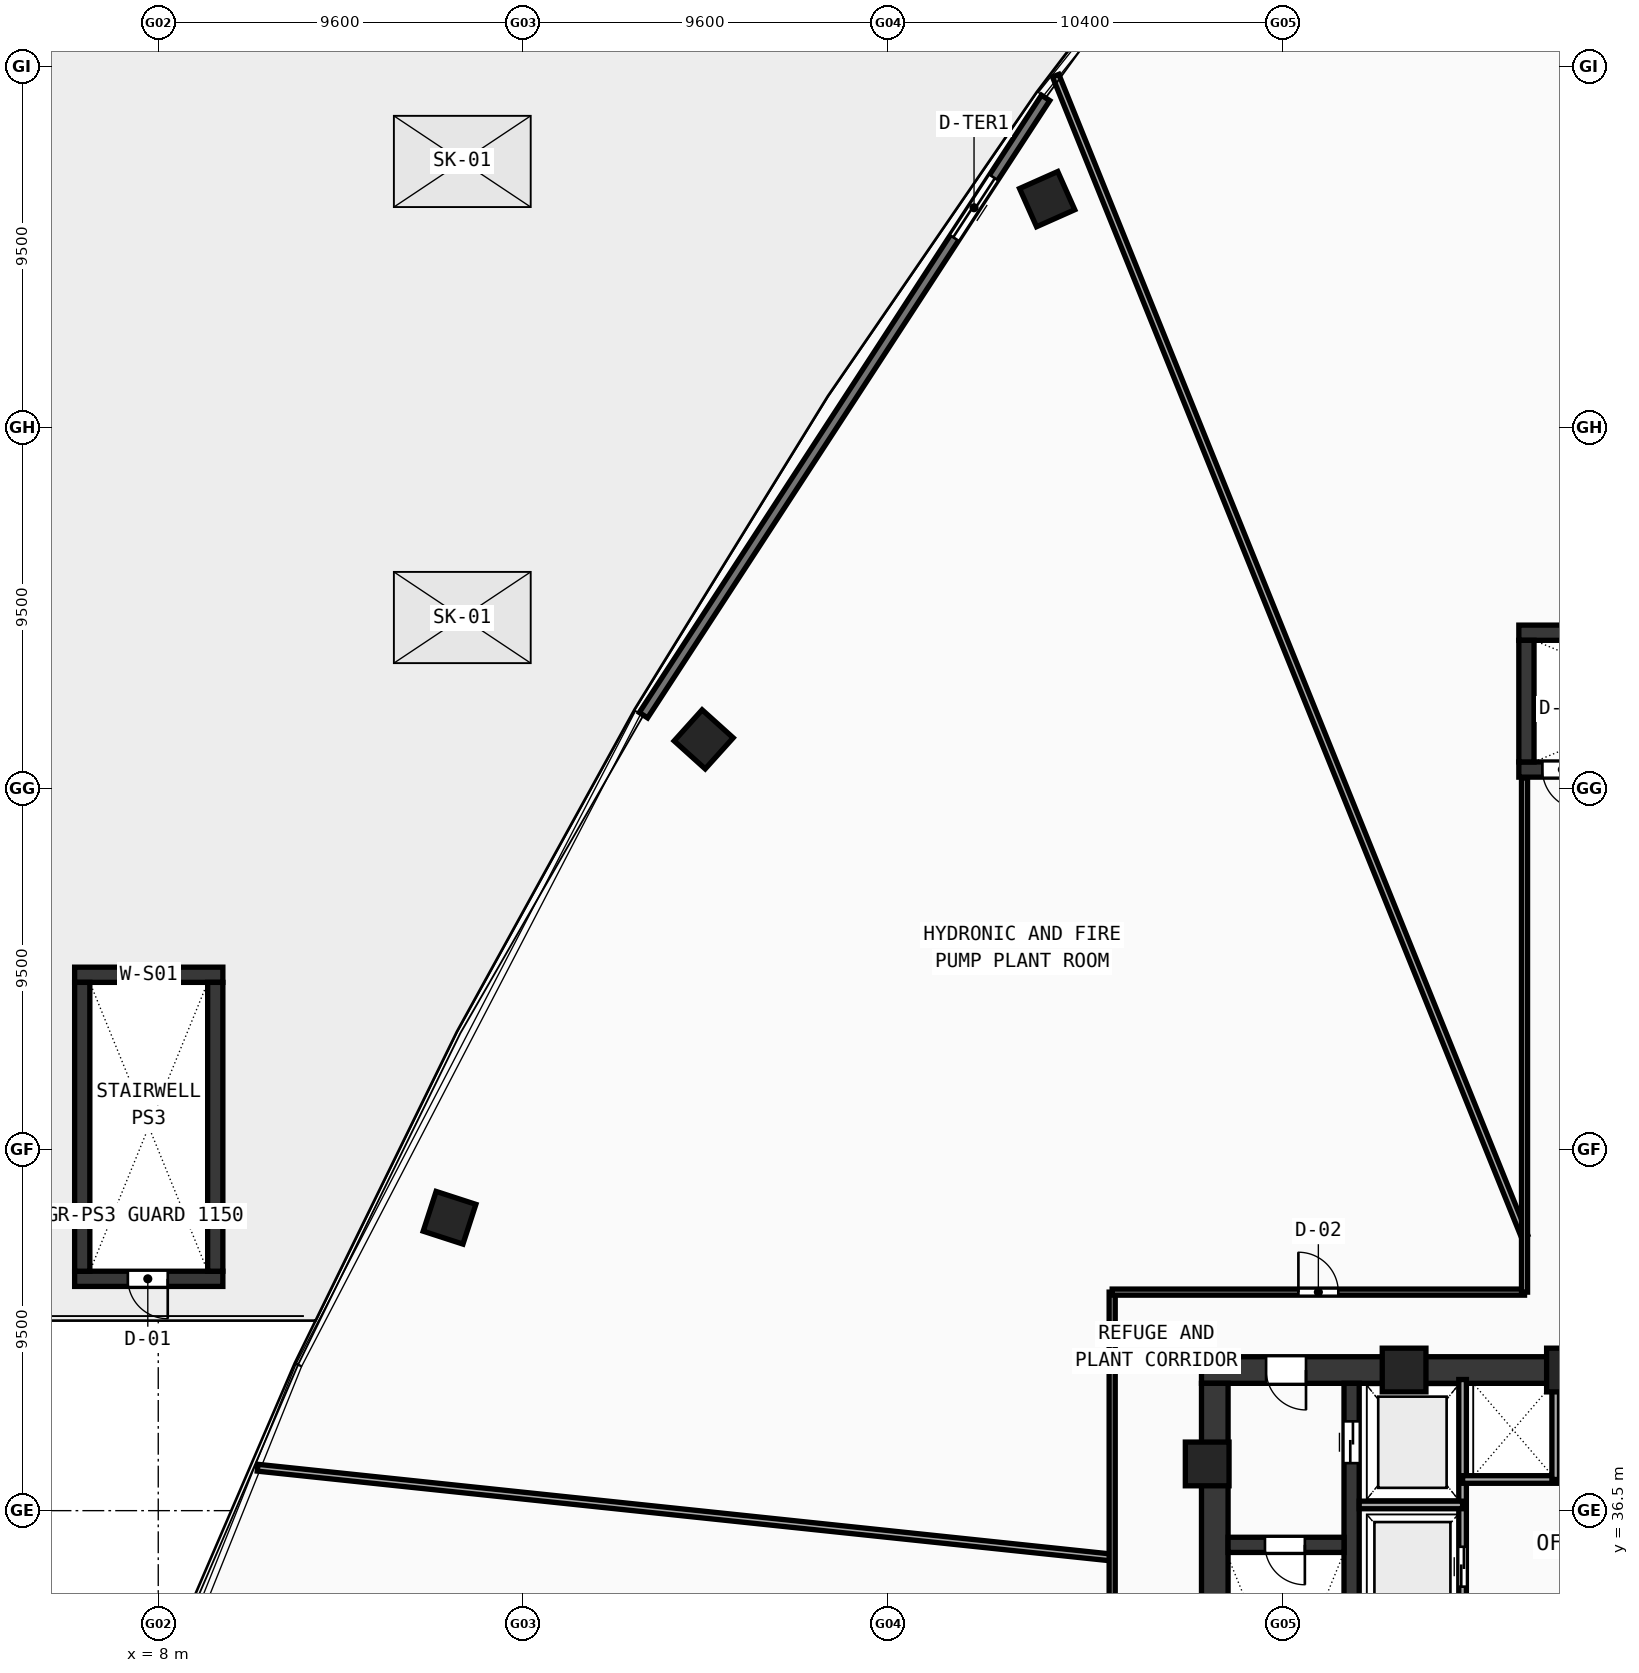
"""IFC4 building model, lengths in metres.
Left out: names, types, materials, properties, quantities, classifications, styles, units other than length and angle.
Written with IfcOpenShell. Run it as: python <this file> out.ifc"""

import sys

from ifc_helpers import new_model, si_unit, direction, frame, frame_2d, origin, origin_with_axes, origin_2d, place, context, subcontext, project, spatial, rectangle, hollow_rectangle, extrude, source, transform, mapped, element, fill, save


model = new_model("IFC4")
c1 = context("Model", 3, precision=1e-05, world=origin(), true_north=direction((0.0, 1.0)))
c2 = subcontext(c1, "Body", "Model", "MODEL_VIEW")
j1 = project(units=[si_unit("LENGTHUNIT", "METRE"), si_unit("PLANEANGLEUNIT", "RADIAN")], contexts=[c1])
p1 = place(None, origin())
s1 = spatial("IfcSite", under=j1, at=p1, CompositionType="ELEMENT")
p2 = place(p1, origin())
s2 = spatial("IfcBuilding", under=s1, at=p2, CompositionType="ELEMENT")
p3 = place(p2, frame((0.0, 0.0, 25.4)))
s3 = spatial("IfcBuildingStorey", under=s2, at=p3, CompositionType="ELEMENT", Elevation=25.4)
p4 = place(p3, frame((35.45, 40.2, 0.0), z_axis=(0.0, 0.0, 1.0), x_axis=(1.0, 0.0, 0.0)))
e1 = element("IfcWall", 1, at=p4, inside=s3, PredefinedType="SHEAR", context=c2, shape_type="SweptSolid", body=[
    extrude(rectangle(XDim=11.35, YDim=0.7, at=frame_2d((5.675, 0.0))), origin(), (0.0, 0.0, 1.0), 4.74),
])
p5 = place(p4, frame((1.7, 0.0, 0.0)))
e2 = element("IfcOpeningElement", 2, at=p5, cuts=e1, PredefinedType="OPENING", context=c2, shape_type="SweptSolid", body=[
    extrude(rectangle(XDim=1.05, YDim=2.1, at=frame_2d((0.525, 1.05))), frame((0.0, 0.36, 0.0), z_axis=(0.0, -1.0, 0.0), x_axis=(1.0, 0.0, 0.0)), (0.0, 0.0, 1.0), 0.72),
])
p6 = place(p3, frame((35.8, 27.85, 0.0), z_axis=(0.0, 0.0, 1.0), x_axis=(0.0, 1.0, 0.0)))
e3 = element("IfcWall", 3, at=p6, inside=s3, PredefinedType="SHEAR", context=c2, shape_type="SweptSolid", body=[
    extrude(rectangle(XDim=12.0, YDim=0.7, at=frame_2d((6.0, 0.0))), origin(), (0.0, 0.0, 1.0), 4.74),
])
p7 = place(p3, frame((39.4, 27.85, 0.0), z_axis=(0.0, 0.0, 1.0), x_axis=(0.0, 1.0, 0.0)))
e4 = element("IfcWall", 4, at=p7, inside=s3, PredefinedType="SHEAR", context=c2, shape_type="SweptSolid", body=[
    extrude(rectangle(XDim=12.0, YDim=0.4, at=frame_2d((6.0, 0.0))), origin(), (0.0, 0.0, 1.0), 4.74),
])
p8 = place(p7, frame((9.9, 0.0, 0.0)))
e5 = element("IfcOpeningElement", 5, at=p8, cuts=e4, PredefinedType="OPENING", context=c2, shape_type="SweptSolid", body=[
    extrude(rectangle(XDim=1.1, YDim=2.1, at=frame_2d((0.55, 1.05))), frame((0.0, 0.21, 0.0), z_axis=(0.0, -1.0, 0.0), x_axis=(1.0, 0.0, 0.0)), (0.0, 0.0, 1.0), 0.42),
])
p9 = place(p3, frame((36.15, 35.6, 0.0), z_axis=(0.0, 0.0, 1.0), x_axis=(1.0, 0.0, 0.0)))
e6 = element("IfcWall", 6, at=p9, inside=s3, PredefinedType="SHEAR", context=c2, shape_type="SweptSolid", body=[
    extrude(rectangle(XDim=3.05, YDim=0.4, at=frame_2d((1.525, 0.0))), origin(), (0.0, 0.0, 1.0), 4.74),
])
p10 = place(p9, frame((0.97, 0.0, 0.0)))
e7 = element("IfcOpeningElement", 7, at=p10, cuts=e6, PredefinedType="OPENING", context=c2, shape_type="SweptSolid", body=[
    extrude(rectangle(XDim=1.05, YDim=2.1, at=frame_2d((0.525, 1.05))), frame((0.0, 0.21, 0.0), z_axis=(0.0, -1.0, 0.0), x_axis=(1.0, 0.0, 0.0)), (0.0, 0.0, 1.0), 0.42),
])
p11 = place(p3, frame((5.8, 50.6, 0.0), z_axis=(0.0, 0.0, 1.0), x_axis=(1.0, 0.0, 0.0)))
e8 = element("IfcWall", 8, at=p11, inside=s3, PredefinedType="SHEAR", context=c2, shape_type="SweptSolid", body=[
    extrude(rectangle(XDim=3.9, YDim=0.4, at=frame_2d((1.95, 0.0))), origin(), (0.0, 0.0, 1.0), 4.74),
])
p12 = place(p3, frame((5.8, 42.6, 0.0), z_axis=(0.0, 0.0, 1.0), x_axis=(1.0, 0.0, 0.0)))
e9 = element("IfcWall", 9, at=p12, inside=s3, PredefinedType="SHEAR", context=c2, shape_type="SweptSolid", body=[
    extrude(rectangle(XDim=3.9, YDim=0.4, at=frame_2d((1.95, 0.0))), origin(), (0.0, 0.0, 1.0), 4.74),
])
p13 = place(p12, frame((1.4, 0.0, 0.0)))
e10 = element("IfcOpeningElement", 10, at=p13, cuts=e9, PredefinedType="OPENING", context=c2, shape_type="SweptSolid", body=[
    extrude(rectangle(XDim=1.05, YDim=2.1, at=frame_2d((0.525, 1.05))), frame((0.0, 0.21, 0.0), z_axis=(0.0, -1.0, 0.0), x_axis=(1.0, 0.0, 0.0)), (0.0, 0.0, 1.0), 0.42),
])
for number, where, z_axis, x_axis in (
    (11, (6.0, 42.8, 0.0), (0.0, 0.0, 1.0), (0.0, 1.0, 0.0)),
    (12, (9.5, 42.8, 0.0), (0.0, 0.0, 1.0), (0.0, 1.0, 0.0)),
):
    element("IfcWall", number, at=place(p3, frame(where, z_axis=z_axis, x_axis=x_axis)), inside=s3, PredefinedType="SHEAR", context=c2, shape_type="SweptSolid", body=[
        extrude(rectangle(XDim=7.6, YDim=0.4, at=frame_2d((3.8, 0.0))), origin(), (0.0, 0.0, 1.0), 4.74),
    ])
p14 = place(p3, frame((43.8, 59.6, 0.0), z_axis=(0.0, 0.0, 1.0), x_axis=(1.0, 0.0, 0.0)))
e13 = element("IfcWall", 13, at=p14, inside=s3, PredefinedType="SHEAR", context=c2, shape_type="SweptSolid", body=[
    extrude(rectangle(XDim=8.5, YDim=0.4, at=frame_2d((4.25, 0.0))), origin(), (0.0, 0.0, 1.0), 4.74),
])
p15 = place(p3, frame((43.8, 56.0, 0.0), z_axis=(0.0, 0.0, 1.0), x_axis=(1.0, 0.0, 0.0)))
e14 = element("IfcWall", 14, at=p15, inside=s3, PredefinedType="SHEAR", context=c2, shape_type="SweptSolid", body=[
    extrude(rectangle(XDim=8.5, YDim=0.4, at=frame_2d((4.25, 0.0))), origin(), (0.0, 0.0, 1.0), 4.74),
])
p16 = place(p15, frame((0.62, 0.0, 0.0)))
e15 = element("IfcOpeningElement", 15, at=p16, cuts=e14, PredefinedType="OPENING", context=c2, shape_type="SweptSolid", body=[
    extrude(rectangle(XDim=1.05, YDim=2.1, at=frame_2d((0.525, 1.05))), frame((0.0, 0.21, 0.0), z_axis=(0.0, -1.0, 0.0), x_axis=(1.0, 0.0, 0.0)), (0.0, 0.0, 1.0), 0.42),
])
p17 = place(p3, frame((44.0, 56.2, 0.0), z_axis=(0.0, 0.0, 1.0), x_axis=(0.0, 1.0, 0.0)))
e16 = element("IfcWall", 16, at=p17, inside=s3, PredefinedType="SHEAR", context=c2, shape_type="SweptSolid", body=[
    extrude(rectangle(XDim=3.2, YDim=0.4, at=frame_2d((1.6, 0.0))), origin(), (0.0, 0.0, 1.0), 4.74),
])
m1 = source(origin(), c2, "Body", "SweptSolid", [
    extrude(hollow_rectangle(XDim=1.15, YDim=1.15, WallThickness=0.048, at=origin_2d()), origin(), (0.0, 0.0, 1.0), 5.02),
])
for number, where, z_axis, x_axis in (
    (17, (45.106, 40.2, -0.28), (0.0, 0.0, 1.0), (1.0, 0.0, 0.0)),
    (18, (40.781, 40.2, -0.28), (0.0, 0.0, 1.0), (1.0, 0.0, 0.0)),
    (19, (35.6, 37.729, -0.28), (0.0, 0.0, 1.0), (1.0, 0.0, 0.0)),
):
    element("IfcColumn", number, at=place(p3, frame(where, z_axis=z_axis, x_axis=x_axis)), inside=s3, PredefinedType="COLUMN", context=c2, shape_type="MappedRepresentation", body=[
        mapped(m1, transform((0.0, 0.0, 0.0), scale=1.0)),
    ])
m2 = source(origin(), c2, "Body", "SweptSolid", [
    extrude(hollow_rectangle(XDim=1.1, YDim=1.1, WallThickness=0.045, at=origin_2d()), origin(), (0.0, 0.0, 1.0), 5.02),
])
for number, where, z_axis, x_axis in (
    (20, (31.389, 71.009, -0.28), (0.0, 0.0, 1.0), (-0.914, -0.407, 0.0)),
    (21, (22.351, 56.794, -0.28), (0.0, 0.0, 1.0), (-0.669, -0.743, 0.0)),
    (22, (15.665, 44.206, -0.28), (0.0, 0.0, 1.0), (-0.309, -0.951, 0.0)),
):
    element("IfcColumn", number, at=place(p3, frame(where, z_axis=z_axis, x_axis=x_axis)), inside=s3, PredefinedType="COLUMN", context=c2, shape_type="MappedRepresentation", body=[
        mapped(m2, transform((0.0, 0.0, 0.0), scale=1.0)),
    ])
p18 = place(p3, frame((31.348, 73.673, 0.0), z_axis=(0.0, 0.0, 1.0), x_axis=(-0.54584859594, -0.837883828648, 0.0)))
e23 = element("IfcWall", 23, at=p18, inside=s3, PredefinedType="STANDARD", context=c2, shape_type="SweptSolid", body=[
    extrude(rectangle(XDim=19.386, YDim=0.26, at=frame_2d((9.693, 0.0))), origin(), (0.0, 0.0, 1.0), 4.24),
])
p19 = place(p18, frame((2.5, 0.0, 0.0)))
e24 = element("IfcOpeningElement", 24, at=p19, cuts=e23, PredefinedType="OPENING", context=c2, shape_type="SweptSolid", body=[
    extrude(rectangle(XDim=1.9, YDim=2.2, at=frame_2d((0.95, 1.1))), frame((0.0, 0.14, 0.0), z_axis=(0.0, -1.0, 0.0), x_axis=(1.0, 0.0, 0.0)), (0.0, 0.0, 1.0), 0.28),
])
p20 = place(p3, frame((42.32, 33.5, 0.0), z_axis=(0.0, 0.0, 1.0), x_axis=(0.0, 1.0, 0.0)))
e25 = element("IfcWall", 25, at=p20, inside=s3, PredefinedType="SOLIDWALL", context=c2, shape_type="SweptSolid", body=[
    extrude(rectangle(XDim=6.45, YDim=0.2, at=frame_2d((3.225, 0.0))), origin(), (0.0, 0.0, 1.0), 4.74),
])
p21 = place(p20, frame((1.0, 0.0, 0.0)))
e26 = element("IfcOpeningElement", 26, at=p21, cuts=e25, PredefinedType="OPENING", context=c2, shape_type="SweptSolid", body=[
    extrude(rectangle(XDim=1.05, YDim=2.1, at=frame_2d((0.525, 1.05))), frame((0.0, 0.11, 0.0), z_axis=(0.0, -1.0, 0.0), x_axis=(1.0, 0.0, 0.0)), (0.0, 0.0, 1.0), 0.22),
])
p22 = place(p3, frame((39.6, 36.65, 0.0), z_axis=(0.0, 0.0, 1.0), x_axis=(1.0, 0.0, 0.0)))
e27 = element("IfcWall", 27, at=p22, inside=s3, PredefinedType="SOLIDWALL", context=c2, shape_type="SweptSolid", body=[
    extrude(rectangle(XDim=2.72, YDim=0.2, at=frame_2d((1.36, 0.0))), origin(), (0.0, 0.0, 1.0), 4.74),
])
p23 = place(p3, frame((42.32, 37.32, 0.0), z_axis=(0.0, 0.0, 1.0), x_axis=(1.0, 0.0, 0.0)))
e28 = element("IfcWall", 28, at=p23, inside=s3, PredefinedType="SOLIDWALL", context=c2, shape_type="SweptSolid", body=[
    extrude(rectangle(XDim=4.73, YDim=0.2, at=frame_2d((2.365, 0.0))), origin(), (0.0, 0.0, 1.0), 4.74),
])
p24 = place(p3, frame((44.77, 37.32, 0.0), z_axis=(0.0, 0.0, 1.0), x_axis=(0.0, 1.0, 0.0)))
e29 = element("IfcWall", 29, at=p24, inside=s3, PredefinedType="SOLIDWALL", context=c2, shape_type="SweptSolid", body=[
    extrude(rectangle(XDim=2.63, YDim=0.2, at=frame_2d((1.315, 0.0))), origin(), (0.0, 0.0, 1.0), 4.74),
])
p25 = place(p3, frame((43.95, 43.724, 0.0), z_axis=(0.0, 0.0, 1.0), x_axis=(-0.374604375639, 0.927184750604, 0.0)))
e30 = element("IfcWall", 30, at=p25, inside=s3, PredefinedType="PARTITIONING", context=c2, shape_type="SweptSolid", body=[
    extrude(rectangle(XDim=32.932, YDim=0.18, at=frame_2d((16.466, 0.0))), origin(), (0.0, 0.0, 1.0), 4.04),
])
p26 = place(p3, frame((33.1, 35.266, 0.0), z_axis=(0.0, 0.0, 1.0), x_axis=(-0.994522243654, 0.104525149493, 0.0)))
e31 = element("IfcWall", 31, at=p26, inside=s3, PredefinedType="PARTITIONING", context=c2, shape_type="SweptSolid", body=[
    extrude(rectangle(XDim=22.61, YDim=0.18, at=frame_2d((11.305, 0.0))), origin(), (0.0, 0.0, 1.0), 4.04),
])
p27 = place(p3, frame((33.1, 24.9, 0.0), z_axis=(0.0, 0.0, 1.0), x_axis=(0.0, 1.0, 0.0)))
e32 = element("IfcWall", 32, at=p27, inside=s3, PredefinedType="PARTITIONING", context=c2, shape_type="SweptSolid", body=[
    extrude(rectangle(XDim=17.35, YDim=0.16, at=frame_2d((8.675, 0.0))), origin(), (0.0, 0.0, 1.0), 4.04),
])
p28 = place(p27, frame((4.358, 0.0, 0.0)))
e33 = element("IfcOpeningElement", 33, at=p28, cuts=e32, PredefinedType="OPENING", context=c2, shape_type="SweptSolid", body=[
    extrude(rectangle(XDim=1.05, YDim=2.1, at=frame_2d((0.525, 1.05))), frame((0.0, 0.09, 0.0), z_axis=(0.0, -1.0, 0.0), x_axis=(1.0, 0.0, 0.0)), (0.0, 0.0, 1.0), 0.18),
])
p29 = place(p3, frame((33.1, 42.25, 0.0), z_axis=(0.0, 0.0, 1.0), x_axis=(1.0, 0.0, 0.0)))
e34 = element("IfcWall", 34, at=p29, inside=s3, PredefinedType="PARTITIONING", context=c2, shape_type="SweptSolid", body=[
    extrude(rectangle(XDim=10.85, YDim=0.16, at=frame_2d((5.425, 0.0))), origin(), (0.0, 0.0, 1.0), 4.04),
])
p30 = place(p29, frame((4.9, 0.0, 0.0)))
e35 = element("IfcOpeningElement", 35, at=p30, cuts=e34, PredefinedType="OPENING", context=c2, shape_type="SweptSolid", body=[
    extrude(rectangle(XDim=1.05, YDim=2.1, at=frame_2d((0.525, 1.05))), frame((0.0, 0.09, 0.0), z_axis=(0.0, -1.0, 0.0), x_axis=(1.0, 0.0, 0.0)), (0.0, 0.0, 1.0), 0.18),
])
p31 = place(p3, frame((43.95, 42.25, 0.0), z_axis=(0.0, 0.0, 1.0), x_axis=(0.0, 1.0, 0.0)))
e36 = element("IfcWall", 36, at=p31, inside=s3, PredefinedType="PARTITIONING", context=c2, shape_type="SweptSolid", body=[
    extrude(rectangle(XDim=13.53, YDim=0.16, at=frame_2d((6.765, 0.0))), origin(), (0.0, 0.0, 1.0), 4.04),
])
p32 = place(p3, frame((0.0, 0.0, -0.28)))
p33 = place(p32, frame((16.0, 60.0, -0.01)))
p34 = place(p33, frame((0.0, 0.0, 0.24)))
e37 = element("IfcWindow", 37, at=p34, inside=s3, PartitioningType="SINGLE_PANEL", PredefinedType="SKYLIGHT", context=c2, shape_type="SweptSolid", body=[
    extrude(rectangle(XDim=3.6, YDim=2.4, at=origin_2d()), origin(), (0.0, 0.0, 1.0), 0.05),
])
p35 = place(p32, frame((16.0, 72.0, -0.01)))
p36 = place(p35, frame((0.0, 0.0, 0.24)))
e38 = element("IfcWindow", 38, at=p36, inside=s3, PartitioningType="SINGLE_PANEL", PredefinedType="SKYLIGHT", context=c2, shape_type="SweptSolid", body=[
    extrude(rectangle(XDim=3.6, YDim=2.4, at=origin_2d()), origin(), (0.0, 0.0, 1.0), 0.05),
])
m3 = source(origin(), c2, "Body", "SweptSolid", [
    extrude(rectangle(XDim=1.9, YDim=2.2, at=frame_2d((0.95, 1.1))), frame((0.0, 0.025, 0.0), z_axis=(0.0, -1.0, 0.0), x_axis=(1.0, 0.0, 0.0)), (0.0, 0.0, 1.0), 0.05),
])
p37 = place(p19, origin_with_axes())
e39 = element("IfcDoor", 39, at=p37, inside=s3, OperationType="DOUBLE_DOOR_SLIDING", PredefinedType="DOOR", context=c2, shape_type="MappedRepresentation", body=[
    mapped(m3, transform((0.0, 0.0, 0.0), scale=1.0)),
])
fill(e24, e39)
m4 = source(origin(), c2, "Body", "SweptSolid", [
    extrude(rectangle(XDim=1.05, YDim=2.1, at=frame_2d((0.525, 1.05))), frame((0.0, 0.025, 0.0), z_axis=(0.0, -1.0, 0.0), x_axis=(1.0, 0.0, 0.0)), (0.0, 0.0, 1.0), 0.05),
])
p38 = place(p10, frame((1.05, 0.0, 0.0), z_axis=(0.0, 0.0, 1.0), x_axis=(-1.0, 0.0, 0.0)))
e40 = element("IfcDoor", 40, at=p38, inside=s3, OperationType="SINGLE_SWING_LEFT", PredefinedType="DOOR", context=c2, shape_type="MappedRepresentation", body=[
    mapped(m4, transform((0.0, 0.0, 0.0), scale=1.0)),
])
fill(e7, e40)
p39 = place(p5, frame((1.05, 0.0, 0.0), z_axis=(0.0, 0.0, 1.0), x_axis=(-1.0, 0.0, 0.0)))
e41 = element("IfcDoor", 41, at=p39, inside=s3, OperationType="SINGLE_SWING_LEFT", PredefinedType="DOOR", context=c2, shape_type="MappedRepresentation", body=[
    mapped(m4, transform((0.0, 0.0, 0.0), scale=1.0)),
])
fill(e2, e41)
m5 = source(origin(), c2, "Body", "SweptSolid", [
    extrude(rectangle(XDim=1.1, YDim=2.1, at=frame_2d((0.55, 1.05))), frame((0.0, 0.025, 0.0), z_axis=(0.0, -1.0, 0.0), x_axis=(1.0, 0.0, 0.0)), (0.0, 0.0, 1.0), 0.05),
])
p40 = place(p8, frame((1.1, 0.0, 0.0), z_axis=(0.0, 0.0, 1.0), x_axis=(-1.0, 0.0, 0.0)))
e42 = element("IfcDoor", 42, at=p40, inside=s3, OperationType="DOUBLE_DOOR_SLIDING", PredefinedType="DOOR", context=c2, shape_type="MappedRepresentation", body=[
    mapped(m5, transform((0.0, 0.0, 0.0), scale=1.0)),
])
fill(e5, e42)
p41 = place(p21, origin_with_axes())
e43 = element("IfcDoor", 43, at=p41, inside=s3, OperationType="DOUBLE_DOOR_SLIDING", PredefinedType="DOOR", context=c2, shape_type="MappedRepresentation", body=[
    mapped(m4, transform((0.0, 0.0, 0.0), scale=1.0)),
])
fill(e26, e43)
p42 = place(p16, frame((1.05, 0.0, 0.0), z_axis=(0.0, 0.0, 1.0), x_axis=(-1.0, 0.0, 0.0)))
e44 = element("IfcDoor", 44, at=p42, inside=s3, OperationType="SINGLE_SWING_LEFT", PredefinedType="DOOR", context=c2, shape_type="MappedRepresentation", body=[
    mapped(m4, transform((0.0, 0.0, 0.0), scale=1.0)),
])
fill(e15, e44)
p43 = place(p30, origin_with_axes())
e45 = element("IfcDoor", 45, at=p43, inside=s3, OperationType="SINGLE_SWING_LEFT", PredefinedType="DOOR", context=c2, shape_type="MappedRepresentation", body=[
    mapped(m4, transform((0.0, 0.0, 0.0), scale=1.0)),
])
fill(e35, e45)
p44 = place(p13, frame((1.05, 0.0, 0.0), z_axis=(0.0, 0.0, 1.0), x_axis=(-1.0, 0.0, 0.0)))
e46 = element("IfcDoor", 46, at=p44, inside=s3, OperationType="SINGLE_SWING_LEFT", PredefinedType="DOOR", context=c2, shape_type="MappedRepresentation", body=[
    mapped(m4, transform((0.0, 0.0, 0.0), scale=1.0)),
])
fill(e10, e46)
save(model, sys.argv[1])
